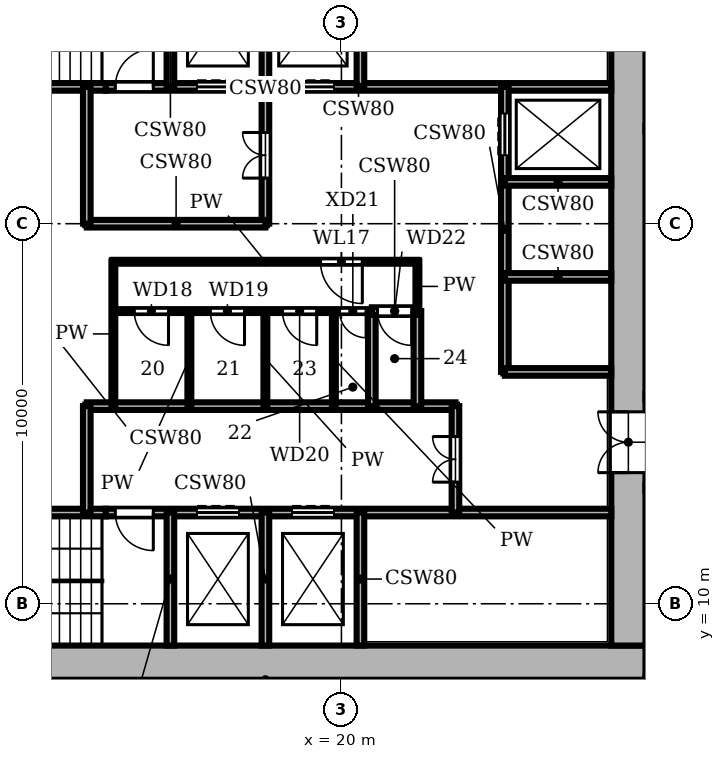
"""IFC4 building model, lengths in metres.
Left out: names, types, materials, properties, quantities, classifications, styles, units other than length and angle.
Written with IfcOpenShell. Run it as: python <this file> out.ifc"""

import sys

from ifc_helpers import new_model, si_unit, direction, frame, frame_2d, origin, place, context, subcontext, project, spatial, rectangle, extrude, element, fill, save


model = new_model("IFC4")
c1 = context("Model", 3, precision=1e-05, world=origin(), true_north=direction((0.0, 1.0)))
c2 = subcontext(c1, "Body", "Model", "MODEL_VIEW")
j1 = project(units=[si_unit("LENGTHUNIT", "METRE"), si_unit("PLANEANGLEUNIT", "RADIAN")], contexts=[c1])
p1 = place(None, origin())
s1 = spatial("IfcSite", under=j1, at=p1, CompositionType="ELEMENT")
p2 = place(p1, origin())
s2 = spatial("IfcBuilding", under=s1, at=p2, CompositionType="ELEMENT")
p3 = place(p2, frame((0.0, 0.0, 93.9)))
s3 = spatial("IfcBuildingStorey", under=s2, at=p3, CompositionType="ELEMENT", Elevation=93.9)
p4 = place(p3, frame((8.0, 8.45, 0.0), z_axis=(0.0, 0.0, 1.0), x_axis=(1.0, 0.0, 0.0)))
e1 = element("IfcWall", 1, at=p4, inside=s3, PredefinedType="SHEAR", context=c2, shape_type="SweptSolid", body=[
    extrude(rectangle(XDim=20.0, YDim=0.9, at=frame_2d((10.0, 0.0))), origin(), (0.0, 0.0, 1.0), 3.9),
])
p5 = place(p3, frame((27.55, 8.9, 0.0), z_axis=(0.0, 0.0, 1.0), x_axis=(0.0, 1.0, 0.0)))
e2 = element("IfcWall", 2, at=p5, inside=s3, PredefinedType="SHEAR", context=c2, shape_type="SweptSolid", body=[
    extrude(rectangle(XDim=18.2, YDim=0.9, at=frame_2d((9.1, 0.0))), origin(), (0.0, 0.0, 1.0), 3.9),
])
p6 = place(p5, frame((4.55, 0.0, 0.0)))
e3 = element("IfcOpeningElement", 3, at=p6, cuts=e2, PredefinedType="OPENING", context=c2, shape_type="SweptSolid", body=[
    extrude(rectangle(XDim=1.6, YDim=2.1, at=frame_2d((0.8, 1.05))), frame((0.0, 0.46, 0.0), z_axis=(0.0, -1.0, 0.0), x_axis=(1.0, 0.0, 0.0)), (0.0, 0.0, 1.0), 0.92),
])
p7 = place(p3, frame((8.9, 12.4, 0.0), z_axis=(0.0, 0.0, 1.0), x_axis=(1.0, 0.0, 0.0)))
e4 = element("IfcWall", 4, at=p7, inside=s3, PredefinedType="SHEAR", context=c2, shape_type="SweptSolid", body=[
    extrude(rectangle(XDim=4.9, YDim=0.2, at=frame_2d((2.45, 0.0))), origin(), (0.0, 0.0, 1.0), 3.58),
])
p8 = place(p3, frame((13.8, 12.4, 0.0), z_axis=(0.0, 0.0, 1.0), x_axis=(1.0, 0.0, 0.0)))
e5 = element("IfcWall", 5, at=p8, inside=s3, PredefinedType="SHEAR", context=c2, shape_type="SweptSolid", body=[
    extrude(rectangle(XDim=13.3, YDim=0.2, at=frame_2d((6.65, 0.0))), origin(), (0.0, 0.0, 1.0), 3.58),
])
p9 = place(p8, frame((2.4, 0.0, 0.0)))
e6 = element("IfcOpeningElement", 6, at=p9, cuts=e5, PredefinedType="OPENING", context=c2, shape_type="SweptSolid", body=[
    extrude(rectangle(XDim=1.1, YDim=2.1, at=frame_2d((0.55, 1.05))), frame((0.0, 0.11, 0.0), z_axis=(0.0, -1.0, 0.0), x_axis=(1.0, 0.0, 0.0)), (0.0, 0.0, 1.0), 0.22),
])
p10 = place(p8, frame((4.9, 0.0, 0.0)))
e7 = element("IfcOpeningElement", 7, at=p10, cuts=e5, PredefinedType="OPENING", context=c2, shape_type="SweptSolid", body=[
    extrude(rectangle(XDim=1.1, YDim=2.1, at=frame_2d((0.55, 1.05))), frame((0.0, 0.11, 0.0), z_axis=(0.0, -1.0, 0.0), x_axis=(1.0, 0.0, 0.0)), (0.0, 0.0, 1.0), 0.22),
])
p11 = place(p8, frame((0.25, 0.0, 0.0)))
e8 = element("IfcOpeningElement", 8, at=p11, cuts=e5, PredefinedType="OPENING", context=c2, shape_type="SweptSolid", body=[
    extrude(rectangle(XDim=1.0, YDim=2.1, at=frame_2d((0.5, 1.05))), frame((0.0, 0.11, 0.0), z_axis=(0.0, -1.0, 0.0), x_axis=(1.0, 0.0, 0.0)), (0.0, 0.0, 1.0), 0.22),
])
p12 = place(p3, frame((13.3, 15.2, 0.0), z_axis=(0.0, 0.0, 1.0), x_axis=(1.0, 0.0, 0.0)))
e9 = element("IfcWall", 9, at=p12, inside=s3, PredefinedType="SHEAR", context=c2, shape_type="SweptSolid", body=[
    extrude(rectangle(XDim=9.7, YDim=0.2, at=frame_2d((4.85, 0.0))), origin(), (0.0, 0.0, 1.0), 3.58),
])
p13 = place(p3, frame((24.3, 16.1, 0.0), z_axis=(0.0, 0.0, 1.0), x_axis=(1.0, 0.0, 0.0)))
e10 = element("IfcWall", 10, at=p13, inside=s3, PredefinedType="SHEAR", context=c2, shape_type="SweptSolid", body=[
    extrude(rectangle(XDim=2.8, YDim=0.2, at=frame_2d((1.4, 0.0))), origin(), (0.0, 0.0, 1.0), 3.58),
])
p14 = place(p3, frame((14.0, 17.7, 0.0), z_axis=(0.0, 0.0, 1.0), x_axis=(1.0, 0.0, 0.0)))
e11 = element("IfcWall", 11, at=p14, inside=s3, PredefinedType="PARTITIONING", context=c2, shape_type="SweptSolid", body=[
    extrude(rectangle(XDim=6.8, YDim=0.1, at=frame_2d((3.4, 0.0))), origin(), (0.0, 0.0, 1.0), 3.58),
])
p15 = place(p14, frame((0.55, 0.0, 0.0)))
e12 = element("IfcOpeningElement", 12, at=p15, cuts=e11, PredefinedType="OPENING", context=c2, shape_type="SweptSolid", body=[
    extrude(rectangle(XDim=0.9, YDim=2.1, at=frame_2d((0.45, 1.05))), frame((0.0, 0.06, 0.0), z_axis=(0.0, -1.0, 0.0), x_axis=(1.0, 0.0, 0.0)), (0.0, 0.0, 1.0), 0.12),
])
p16 = place(p14, frame((2.55, 0.0, 0.0)))
e13 = element("IfcOpeningElement", 13, at=p16, cuts=e11, PredefinedType="OPENING", context=c2, shape_type="SweptSolid", body=[
    extrude(rectangle(XDim=0.9, YDim=2.1, at=frame_2d((0.45, 1.05))), frame((0.0, 0.06, 0.0), z_axis=(0.0, -1.0, 0.0), x_axis=(1.0, 0.0, 0.0)), (0.0, 0.0, 1.0), 0.12),
])
p17 = place(p14, frame((4.45, 0.0, 0.0)))
e14 = element("IfcOpeningElement", 14, at=p17, cuts=e11, PredefinedType="OPENING", context=c2, shape_type="SweptSolid", body=[
    extrude(rectangle(XDim=0.9, YDim=2.1, at=frame_2d((0.45, 1.05))), frame((0.0, 0.06, 0.0), z_axis=(0.0, -1.0, 0.0), x_axis=(1.0, 0.0, 0.0)), (0.0, 0.0, 1.0), 0.12),
])
p18 = place(p14, frame((5.95, 0.0, 0.0)))
e15 = element("IfcOpeningElement", 15, at=p18, cuts=e11, PredefinedType="OPENING", context=c2, shape_type="SweptSolid", body=[
    extrude(rectangle(XDim=0.7, YDim=2.1, at=frame_2d((0.35, 1.05))), frame((0.0, 0.06, 0.0), z_axis=(0.0, -1.0, 0.0), x_axis=(1.0, 0.0, 0.0)), (0.0, 0.0, 1.0), 0.12),
])
p19 = place(p3, frame((20.8, 17.7, 0.0), z_axis=(0.0, 0.0, 1.0), x_axis=(1.0, 0.0, 0.0)))
e16 = element("IfcWall", 16, at=p19, inside=s3, PredefinedType="SHEAR", context=c2, shape_type="SweptSolid", body=[
    extrude(rectangle(XDim=1.2, YDim=0.2, at=frame_2d((0.6, 0.0))), origin(), (0.0, 0.0, 1.0), 3.58),
])
p20 = place(p19, frame((0.15, 0.0, 0.0)))
e17 = element("IfcOpeningElement", 17, at=p20, cuts=e16, PredefinedType="OPENING", context=c2, shape_type="SweptSolid", body=[
    extrude(rectangle(XDim=0.9, YDim=2.1, at=frame_2d((0.45, 1.05))), frame((0.0, 0.11, 0.0), z_axis=(0.0, -1.0, 0.0), x_axis=(1.0, 0.0, 0.0)), (0.0, 0.0, 1.0), 0.22),
])
p21 = place(p3, frame((24.3, 18.6, 0.0), z_axis=(0.0, 0.0, 1.0), x_axis=(1.0, 0.0, 0.0)))
e18 = element("IfcWall", 18, at=p21, inside=s3, PredefinedType="SHEAR", context=c2, shape_type="SweptSolid", body=[
    extrude(rectangle(XDim=2.8, YDim=0.2, at=frame_2d((1.4, 0.0))), origin(), (0.0, 0.0, 1.0), 3.58),
])
p22 = place(p3, frame((14.0, 19.0, 0.0), z_axis=(0.0, 0.0, 1.0), x_axis=(1.0, 0.0, 0.0)))
e19 = element("IfcWall", 19, at=p22, inside=s3, PredefinedType="PARTITIONING", context=c2, shape_type="SweptSolid", body=[
    extrude(rectangle(XDim=8.0, YDim=0.1, at=frame_2d((4.0, 0.0))), origin(), (0.0, 0.0, 1.0), 3.58),
])
p23 = place(p22, frame((5.45, 0.0, 0.0)))
e20 = element("IfcOpeningElement", 20, at=p23, cuts=e19, PredefinedType="OPENING", context=c2, shape_type="SweptSolid", body=[
    extrude(rectangle(XDim=1.1, YDim=2.1, at=frame_2d((0.55, 1.05))), frame((0.0, 0.06, 0.0), z_axis=(0.0, -1.0, 0.0), x_axis=(1.0, 0.0, 0.0)), (0.0, 0.0, 1.0), 0.12),
])
p24 = place(p3, frame((13.3, 20.0, 0.0), z_axis=(0.0, 0.0, 1.0), x_axis=(1.0, 0.0, 0.0)))
e21 = element("IfcWall", 21, at=p24, inside=s3, PredefinedType="SHEAR", context=c2, shape_type="SweptSolid", body=[
    extrude(rectangle(XDim=4.7, YDim=0.2, at=frame_2d((2.35, 0.0))), origin(), (0.0, 0.0, 1.0), 3.58),
])
p25 = place(p3, frame((24.3, 21.1, 0.0), z_axis=(0.0, 0.0, 1.0), x_axis=(1.0, 0.0, 0.0)))
e22 = element("IfcWall", 22, at=p25, inside=s3, PredefinedType="SHEAR", context=c2, shape_type="SweptSolid", body=[
    extrude(rectangle(XDim=2.8, YDim=0.2, at=frame_2d((1.4, 0.0))), origin(), (0.0, 0.0, 1.0), 3.58),
])
p26 = place(p3, frame((8.9, 23.6, 0.0), z_axis=(0.0, 0.0, 1.0), x_axis=(1.0, 0.0, 0.0)))
e23 = element("IfcWall", 23, at=p26, inside=s3, PredefinedType="SHEAR", context=c2, shape_type="SweptSolid", body=[
    extrude(rectangle(XDim=4.9, YDim=0.2, at=frame_2d((2.45, 0.0))), origin(), (0.0, 0.0, 1.0), 3.58),
])
p27 = place(p3, frame((13.8, 23.6, 0.0), z_axis=(0.0, 0.0, 1.0), x_axis=(1.0, 0.0, 0.0)))
e24 = element("IfcWall", 24, at=p27, inside=s3, PredefinedType="SHEAR", context=c2, shape_type="SweptSolid", body=[
    extrude(rectangle(XDim=13.3, YDim=0.2, at=frame_2d((6.65, 0.0))), origin(), (0.0, 0.0, 1.0), 3.58),
])
p28 = place(p27, frame((2.4, 0.0, 0.0)))
e25 = element("IfcOpeningElement", 25, at=p28, cuts=e24, PredefinedType="OPENING", context=c2, shape_type="SweptSolid", body=[
    extrude(rectangle(XDim=1.1, YDim=2.1, at=frame_2d((0.55, 1.05))), frame((0.0, 0.11, 0.0), z_axis=(0.0, -1.0, 0.0), x_axis=(1.0, 0.0, 0.0)), (0.0, 0.0, 1.0), 0.22),
])
p29 = place(p27, frame((4.9, 0.0, 0.0)))
e26 = element("IfcOpeningElement", 26, at=p29, cuts=e24, PredefinedType="OPENING", context=c2, shape_type="SweptSolid", body=[
    extrude(rectangle(XDim=1.1, YDim=2.1, at=frame_2d((0.55, 1.05))), frame((0.0, 0.11, 0.0), z_axis=(0.0, -1.0, 0.0), x_axis=(1.0, 0.0, 0.0)), (0.0, 0.0, 1.0), 0.22),
])
p30 = place(p27, frame((0.25, 0.0, 0.0)))
e27 = element("IfcOpeningElement", 27, at=p30, cuts=e24, PredefinedType="OPENING", context=c2, shape_type="SweptSolid", body=[
    extrude(rectangle(XDim=1.0, YDim=2.1, at=frame_2d((0.5, 1.05))), frame((0.0, 0.11, 0.0), z_axis=(0.0, -1.0, 0.0), x_axis=(1.0, 0.0, 0.0)), (0.0, 0.0, 1.0), 0.22),
])
p31 = place(p3, frame((13.3, 12.4, 0.0), z_axis=(0.0, 0.0, 1.0), x_axis=(0.0, 1.0, 0.0)))
e28 = element("IfcWall", 28, at=p31, inside=s3, PredefinedType="SHEAR", context=c2, shape_type="SweptSolid", body=[
    extrude(rectangle(XDim=2.8, YDim=0.2, at=frame_2d((1.4, 0.0))), origin(), (0.0, 0.0, 1.0), 3.58),
])
p32 = place(p3, frame((13.3, 20.0, 0.0), z_axis=(0.0, 0.0, 1.0), x_axis=(0.0, 1.0, 0.0)))
e29 = element("IfcWall", 29, at=p32, inside=s3, PredefinedType="SHEAR", context=c2, shape_type="SweptSolid", body=[
    extrude(rectangle(XDim=3.6, YDim=0.2, at=frame_2d((1.8, 0.0))), origin(), (0.0, 0.0, 1.0), 3.58),
])
p33 = place(p3, frame((14.0, 15.2, 0.0), z_axis=(0.0, 0.0, 1.0), x_axis=(0.0, 1.0, 0.0)))
e30 = element("IfcWall", 30, at=p33, inside=s3, PredefinedType="PARTITIONING", context=c2, shape_type="SweptSolid", body=[
    extrude(rectangle(XDim=3.8, YDim=0.1, at=frame_2d((1.9, 0.0))), origin(), (0.0, 0.0, 1.0), 3.58),
])
for number, where, z_axis, x_axis in (
    (31, (15.5, 8.9, 0.0), (0.0, 0.0, 1.0), (0.0, 1.0, 0.0)),
    (32, (15.5, 23.6, 0.0), (0.0, 0.0, 1.0), (0.0, 1.0, 0.0)),
):
    element("IfcWall", number, at=place(p3, frame(where, z_axis=z_axis, x_axis=x_axis)), inside=s3, PredefinedType="SHEAR", context=c2, shape_type="SweptSolid", body=[
        extrude(rectangle(XDim=3.5, YDim=0.2, at=frame_2d((1.75, 0.0))), origin(), (0.0, 0.0, 1.0), 3.58),
    ])
for number, where, z_axis, x_axis in (
    (33, (16.0, 15.2, 0.0), (0.0, 0.0, 1.0), (0.0, 1.0, 0.0)),
    (34, (18.0, 15.2, 0.0), (0.0, 0.0, 1.0), (0.0, 1.0, 0.0)),
):
    element("IfcWall", number, at=place(p3, frame(where, z_axis=z_axis, x_axis=x_axis)), inside=s3, PredefinedType="PARTITIONING", context=c2, shape_type="SweptSolid", body=[
        extrude(rectangle(XDim=2.5, YDim=0.1, at=frame_2d((1.25, 0.0))), origin(), (0.0, 0.0, 1.0), 3.58),
    ])
p34 = place(p3, frame((18.0, 8.9, 0.0), z_axis=(0.0, 0.0, 1.0), x_axis=(0.0, 1.0, 0.0)))
e35 = element("IfcWall", 35, at=p34, inside=s3, PredefinedType="SHEAR", context=c2, shape_type="SweptSolid", body=[
    extrude(rectangle(XDim=3.5, YDim=0.2, at=frame_2d((1.75, 0.0))), origin(), (0.0, 0.0, 1.0), 3.58),
])
p35 = place(p3, frame((18.0, 20.0, 0.0), z_axis=(0.0, 0.0, 1.0), x_axis=(0.0, 1.0, 0.0)))
e36 = element("IfcWall", 36, at=p35, inside=s3, PredefinedType="SHEAR", context=c2, shape_type="SweptSolid", body=[
    extrude(rectangle(XDim=7.1, YDim=0.2, at=frame_2d((3.55, 0.0))), origin(), (0.0, 0.0, 1.0), 3.58),
])
p36 = place(p35, frame((1.2, 0.0, 0.0)))
e37 = element("IfcOpeningElement", 37, at=p36, cuts=e36, PredefinedType="OPENING", context=c2, shape_type="SweptSolid", body=[
    extrude(rectangle(XDim=1.2, YDim=2.1, at=frame_2d((0.6, 1.05))), frame((0.0, 0.11, 0.0), z_axis=(0.0, -1.0, 0.0), x_axis=(1.0, 0.0, 0.0)), (0.0, 0.0, 1.0), 0.22),
])
p37 = place(p3, frame((19.8, 15.2, 0.0), z_axis=(0.0, 0.0, 1.0), x_axis=(0.0, 1.0, 0.0)))
e38 = element("IfcWall", 38, at=p37, inside=s3, PredefinedType="PARTITIONING", context=c2, shape_type="SweptSolid", body=[
    extrude(rectangle(XDim=2.5, YDim=0.1, at=frame_2d((1.25, 0.0))), origin(), (0.0, 0.0, 1.0), 3.58),
])
for number, where, z_axis, x_axis in (
    (39, (20.5, 8.9, 0.0), (0.0, 0.0, 1.0), (0.0, 1.0, 0.0)),
    (40, (20.5, 23.6, 0.0), (0.0, 0.0, 1.0), (0.0, 1.0, 0.0)),
):
    element("IfcWall", number, at=place(p3, frame(where, z_axis=z_axis, x_axis=x_axis)), inside=s3, PredefinedType="SHEAR", context=c2, shape_type="SweptSolid", body=[
        extrude(rectangle(XDim=3.5, YDim=0.2, at=frame_2d((1.75, 0.0))), origin(), (0.0, 0.0, 1.0), 3.58),
    ])
p38 = place(p3, frame((20.8, 15.2, 0.0), z_axis=(0.0, 0.0, 1.0), x_axis=(0.0, 1.0, 0.0)))
e41 = element("IfcWall", 41, at=p38, inside=s3, PredefinedType="SHEAR", context=c2, shape_type="SweptSolid", body=[
    extrude(rectangle(XDim=2.5, YDim=0.2, at=frame_2d((1.25, 0.0))), origin(), (0.0, 0.0, 1.0), 3.58),
])
p39 = place(p3, frame((22.0, 17.7, 0.0), z_axis=(0.0, 0.0, 1.0), x_axis=(0.0, 1.0, 0.0)))
e42 = element("IfcWall", 42, at=p39, inside=s3, PredefinedType="PARTITIONING", context=c2, shape_type="SweptSolid", body=[
    extrude(rectangle(XDim=1.3, YDim=0.1, at=frame_2d((0.65, 0.0))), origin(), (0.0, 0.0, 1.0), 3.58),
])
p40 = place(p3, frame((22.0, 15.2, 0.0), z_axis=(0.0, 0.0, 1.0), x_axis=(0.0, 1.0, 0.0)))
e43 = element("IfcWall", 43, at=p40, inside=s3, PredefinedType="SHEAR", context=c2, shape_type="SweptSolid", body=[
    extrude(rectangle(XDim=2.5, YDim=0.2, at=frame_2d((1.25, 0.0))), origin(), (0.0, 0.0, 1.0), 3.58),
])
p41 = place(p3, frame((23.0, 12.4, 0.0), z_axis=(0.0, 0.0, 1.0), x_axis=(0.0, 1.0, 0.0)))
e44 = element("IfcWall", 44, at=p41, inside=s3, PredefinedType="SHEAR", context=c2, shape_type="SweptSolid", body=[
    extrude(rectangle(XDim=2.8, YDim=0.2, at=frame_2d((1.4, 0.0))), origin(), (0.0, 0.0, 1.0), 3.58),
])
p42 = place(p41, frame((0.8, 0.0, 0.0)))
e45 = element("IfcOpeningElement", 45, at=p42, cuts=e44, PredefinedType="OPENING", context=c2, shape_type="SweptSolid", body=[
    extrude(rectangle(XDim=1.2, YDim=2.1, at=frame_2d((0.6, 1.05))), frame((0.0, 0.11, 0.0), z_axis=(0.0, -1.0, 0.0), x_axis=(1.0, 0.0, 0.0)), (0.0, 0.0, 1.0), 0.22),
])
p43 = place(p3, frame((24.3, 16.1, 0.0), z_axis=(0.0, 0.0, 1.0), x_axis=(0.0, 1.0, 0.0)))
e46 = element("IfcWall", 46, at=p43, inside=s3, PredefinedType="SHEAR", context=c2, shape_type="SweptSolid", body=[
    extrude(rectangle(XDim=7.5, YDim=0.2, at=frame_2d((3.75, 0.0))), origin(), (0.0, 0.0, 1.0), 3.58),
])
p44 = place(p43, frame((5.7, 0.0, 0.0)))
e47 = element("IfcOpeningElement", 47, at=p44, cuts=e46, PredefinedType="OPENING", context=c2, shape_type="SweptSolid", body=[
    extrude(rectangle(XDim=1.1, YDim=2.1, at=frame_2d((0.55, 1.05))), frame((0.0, 0.11, 0.0), z_axis=(0.0, -1.0, 0.0), x_axis=(1.0, 0.0, 0.0)), (0.0, 0.0, 1.0), 0.22),
])
for number, where, z_axis, x_axis in (
    (48, (28.0, 15.45, 0.0), (0.0, 0.0, 1.0), (1.0, 0.0, 0.0)),
    (49, (28.0, 22.5, 0.0), (0.0, 0.0, 1.0), (1.0, 0.0, 0.0)),
):
    element("IfcWall", number, at=place(p3, frame(where, z_axis=z_axis, x_axis=x_axis)), inside=s3, PredefinedType="PARTITIONING", context=c2, shape_type="SweptSolid", body=[
        extrude(rectangle(XDim=2.8, YDim=0.15, at=frame_2d((1.4, 0.0))), origin(), (0.0, 0.0, 1.0), 3.58),
    ])
p45 = place(p44, origin())
e50 = element("IfcDoor", 50, at=p45, inside=s3, OperationType="DOUBLE_DOOR_SLIDING", PredefinedType="DOOR", context=c2, shape_type="SweptSolid", body=[
    extrude(rectangle(XDim=1.1, YDim=2.1, at=frame_2d((0.55, 1.05))), frame((0.0, 0.025, 0.0), z_axis=(0.0, -1.0, 0.0), x_axis=(1.0, 0.0, 0.0)), (0.0, 0.0, 1.0), 0.05),
])
fill(e47, e50)
p46 = place(p9, origin())
e51 = element("IfcDoor", 51, at=p46, inside=s3, OperationType="DOUBLE_DOOR_SLIDING", PredefinedType="DOOR", context=c2, shape_type="SweptSolid", body=[
    extrude(rectangle(XDim=1.1, YDim=2.1, at=frame_2d((0.55, 1.05))), frame((0.0, 0.025, 0.0), z_axis=(0.0, -1.0, 0.0), x_axis=(1.0, 0.0, 0.0)), (0.0, 0.0, 1.0), 0.05),
])
fill(e6, e51)
p47 = place(p10, origin())
e52 = element("IfcDoor", 52, at=p47, inside=s3, OperationType="DOUBLE_DOOR_SLIDING", PredefinedType="DOOR", context=c2, shape_type="SweptSolid", body=[
    extrude(rectangle(XDim=1.1, YDim=2.1, at=frame_2d((0.55, 1.05))), frame((0.0, 0.025, 0.0), z_axis=(0.0, -1.0, 0.0), x_axis=(1.0, 0.0, 0.0)), (0.0, 0.0, 1.0), 0.05),
])
fill(e7, e52)
p48 = place(p28, origin())
e53 = element("IfcDoor", 53, at=p48, inside=s3, OperationType="DOUBLE_DOOR_SLIDING", PredefinedType="DOOR", context=c2, shape_type="SweptSolid", body=[
    extrude(rectangle(XDim=1.1, YDim=2.1, at=frame_2d((0.55, 1.05))), frame((0.0, 0.025, 0.0), z_axis=(0.0, -1.0, 0.0), x_axis=(1.0, 0.0, 0.0)), (0.0, 0.0, 1.0), 0.05),
])
fill(e25, e53)
p49 = place(p29, origin())
e54 = element("IfcDoor", 54, at=p49, inside=s3, OperationType="DOUBLE_DOOR_SLIDING", PredefinedType="DOOR", context=c2, shape_type="SweptSolid", body=[
    extrude(rectangle(XDim=1.1, YDim=2.1, at=frame_2d((0.55, 1.05))), frame((0.0, 0.025, 0.0), z_axis=(0.0, -1.0, 0.0), x_axis=(1.0, 0.0, 0.0)), (0.0, 0.0, 1.0), 0.05),
])
fill(e26, e54)
p50 = place(p11, frame((1.0, 0.0, 0.0), z_axis=(0.0, 0.0, 1.0), x_axis=(-1.0, 0.0, 0.0)))
e55 = element("IfcDoor", 55, at=p50, inside=s3, OperationType="SINGLE_SWING_LEFT", PredefinedType="DOOR", context=c2, shape_type="SweptSolid", body=[
    extrude(rectangle(XDim=1.0, YDim=2.1, at=frame_2d((0.5, 1.05))), frame((0.0, 0.025, 0.0), z_axis=(0.0, -1.0, 0.0), x_axis=(1.0, 0.0, 0.0)), (0.0, 0.0, 1.0), 0.05),
])
fill(e8, e55)
p51 = place(p30, origin())
e56 = element("IfcDoor", 56, at=p51, inside=s3, OperationType="SINGLE_SWING_RIGHT", PredefinedType="DOOR", context=c2, shape_type="SweptSolid", body=[
    extrude(rectangle(XDim=1.0, YDim=2.1, at=frame_2d((0.5, 1.05))), frame((0.0, 0.025, 0.0), z_axis=(0.0, -1.0, 0.0), x_axis=(1.0, 0.0, 0.0)), (0.0, 0.0, 1.0), 0.05),
])
fill(e27, e56)
p52 = place(p42, origin())
e57 = element("IfcDoor", 57, at=p52, inside=s3, OperationType="DOUBLE_DOOR_SINGLE_SWING", PredefinedType="DOOR", context=c2, shape_type="SweptSolid", body=[
    extrude(rectangle(XDim=1.2, YDim=2.1, at=frame_2d((0.6, 1.05))), frame((0.0, 0.025, 0.0), z_axis=(0.0, -1.0, 0.0), x_axis=(1.0, 0.0, 0.0)), (0.0, 0.0, 1.0), 0.05),
])
fill(e45, e57)
p53 = place(p36, origin())
e58 = element("IfcDoor", 58, at=p53, inside=s3, OperationType="DOUBLE_DOOR_SINGLE_SWING", PredefinedType="DOOR", context=c2, shape_type="SweptSolid", body=[
    extrude(rectangle(XDim=1.2, YDim=2.1, at=frame_2d((0.6, 1.05))), frame((0.0, 0.025, 0.0), z_axis=(0.0, -1.0, 0.0), x_axis=(1.0, 0.0, 0.0)), (0.0, 0.0, 1.0), 0.05),
])
fill(e37, e58)
p54 = place(p23, frame((1.1, 0.0, 0.0), z_axis=(0.0, 0.0, 1.0), x_axis=(-1.0, 0.0, 0.0)))
e59 = element("IfcDoor", 59, at=p54, inside=s3, OperationType="SINGLE_SWING_LEFT", PredefinedType="DOOR", context=c2, shape_type="SweptSolid", body=[
    extrude(rectangle(XDim=1.1, YDim=2.1, at=frame_2d((0.55, 1.05))), frame((0.0, 0.025, 0.0), z_axis=(0.0, -1.0, 0.0), x_axis=(1.0, 0.0, 0.0)), (0.0, 0.0, 1.0), 0.05),
])
fill(e20, e59)
p55 = place(p15, frame((0.9, 0.0, 0.0), z_axis=(0.0, 0.0, 1.0), x_axis=(-1.0, 0.0, 0.0)))
e60 = element("IfcDoor", 60, at=p55, inside=s3, OperationType="SINGLE_SWING_LEFT", PredefinedType="DOOR", context=c2, shape_type="SweptSolid", body=[
    extrude(rectangle(XDim=0.9, YDim=2.1, at=frame_2d((0.45, 1.05))), frame((0.0, 0.025, 0.0), z_axis=(0.0, -1.0, 0.0), x_axis=(1.0, 0.0, 0.0)), (0.0, 0.0, 1.0), 0.05),
])
fill(e12, e60)
p56 = place(p16, frame((0.9, 0.0, 0.0), z_axis=(0.0, 0.0, 1.0), x_axis=(-1.0, 0.0, 0.0)))
e61 = element("IfcDoor", 61, at=p56, inside=s3, OperationType="SINGLE_SWING_LEFT", PredefinedType="DOOR", context=c2, shape_type="SweptSolid", body=[
    extrude(rectangle(XDim=0.9, YDim=2.1, at=frame_2d((0.45, 1.05))), frame((0.0, 0.025, 0.0), z_axis=(0.0, -1.0, 0.0), x_axis=(1.0, 0.0, 0.0)), (0.0, 0.0, 1.0), 0.05),
])
fill(e13, e61)
p57 = place(p17, frame((0.9, 0.0, 0.0), z_axis=(0.0, 0.0, 1.0), x_axis=(-1.0, 0.0, 0.0)))
e62 = element("IfcDoor", 62, at=p57, inside=s3, OperationType="SINGLE_SWING_LEFT", PredefinedType="DOOR", context=c2, shape_type="SweptSolid", body=[
    extrude(rectangle(XDim=0.9, YDim=2.1, at=frame_2d((0.45, 1.05))), frame((0.0, 0.025, 0.0), z_axis=(0.0, -1.0, 0.0), x_axis=(1.0, 0.0, 0.0)), (0.0, 0.0, 1.0), 0.05),
])
fill(e14, e62)
p58 = place(p18, frame((0.7, 0.0, 0.0), z_axis=(0.0, 0.0, 1.0), x_axis=(-1.0, 0.0, 0.0)))
e63 = element("IfcDoor", 63, at=p58, inside=s3, OperationType="SINGLE_SWING_LEFT", PredefinedType="DOOR", context=c2, shape_type="SweptSolid", body=[
    extrude(rectangle(XDim=0.7, YDim=2.1, at=frame_2d((0.35, 1.05))), frame((0.0, 0.025, 0.0), z_axis=(0.0, -1.0, 0.0), x_axis=(1.0, 0.0, 0.0)), (0.0, 0.0, 1.0), 0.05),
])
fill(e15, e63)
p59 = place(p20, frame((0.9, 0.0, 0.0), z_axis=(0.0, 0.0, 1.0), x_axis=(-1.0, 0.0, 0.0)))
e64 = element("IfcDoor", 64, at=p59, inside=s3, OperationType="SINGLE_SWING_LEFT", PredefinedType="DOOR", context=c2, shape_type="SweptSolid", body=[
    extrude(rectangle(XDim=0.9, YDim=2.1, at=frame_2d((0.45, 1.05))), frame((0.0, 0.025, 0.0), z_axis=(0.0, -1.0, 0.0), x_axis=(1.0, 0.0, 0.0)), (0.0, 0.0, 1.0), 0.05),
])
fill(e17, e64)
p60 = place(p6, origin())
e65 = element("IfcDoor", 65, at=p60, inside=s3, OperationType="DOUBLE_DOOR_SINGLE_SWING", PredefinedType="DOOR", context=c2, shape_type="SweptSolid", body=[
    extrude(rectangle(XDim=1.6, YDim=2.1, at=frame_2d((0.8, 1.05))), frame((0.0, 0.025, 0.0), z_axis=(0.0, -1.0, 0.0), x_axis=(1.0, 0.0, 0.0)), (0.0, 0.0, 1.0), 0.05),
])
fill(e3, e65)
save(model, sys.argv[1])
